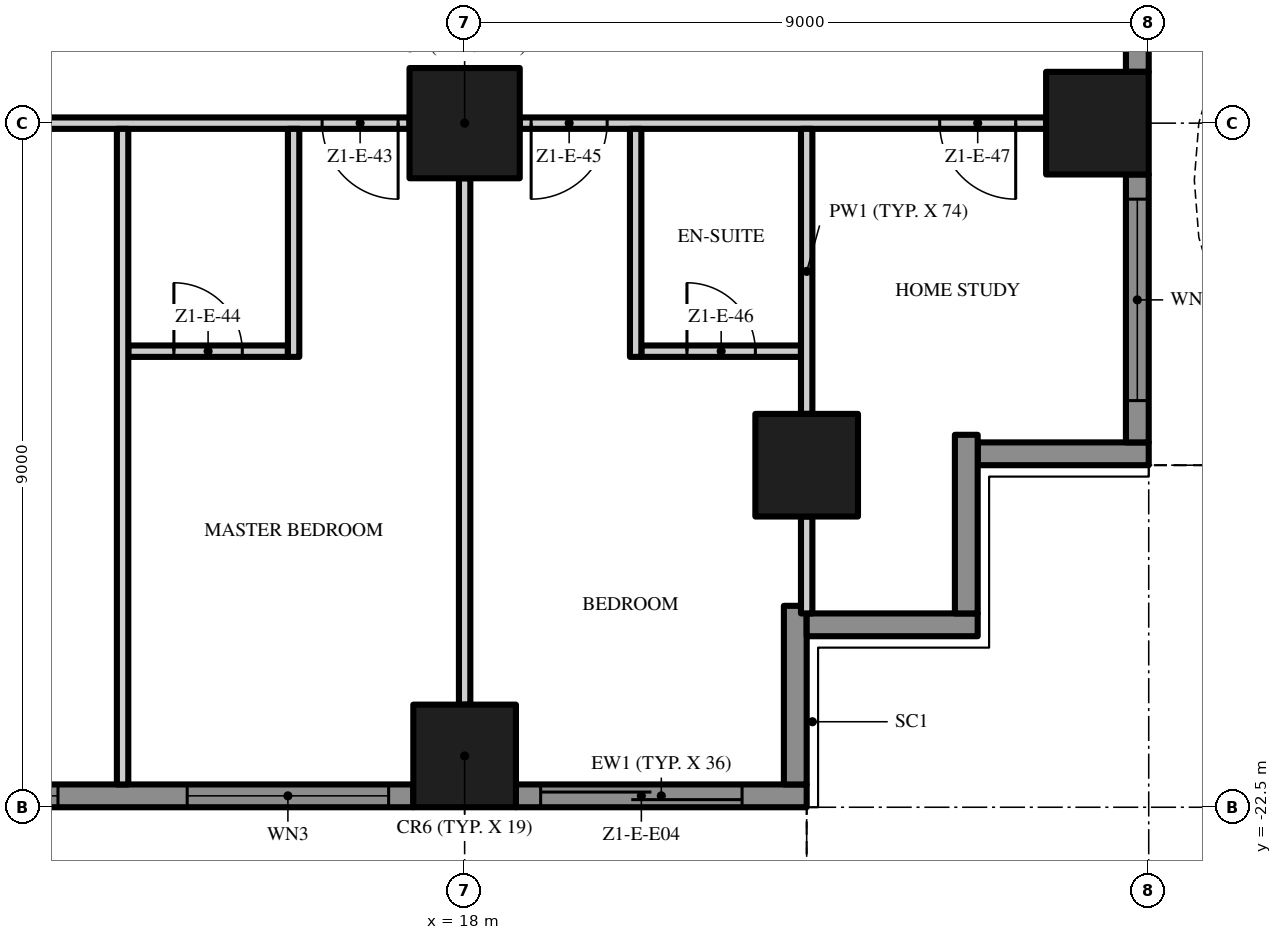
"""IFC4 building model, lengths in metres.
Left out: names, types, materials, properties, quantities, classifications, styles, units other than length and angle.
Written with IfcOpenShell. Run it as: python <this file> out.ifc"""

import sys

from ifc_helpers import new_model, si_unit, direction, frame, frame_2d, origin, origin_2d, place, context, subcontext, project, spatial, polyline, rectangle, outline, extrude, element, fill, save


model = new_model("IFC4")
c1 = context("Model", 3, precision=1e-05, world=origin(), true_north=direction((0.0, 1.0)))
c2 = subcontext(c1, "Body", "Model", "MODEL_VIEW")
j1 = project(units=[si_unit("LENGTHUNIT", "METRE"), si_unit("PLANEANGLEUNIT", "RADIAN")], contexts=[c1])
p1 = place(None, origin())
s1 = spatial("IfcSite", under=j1, at=p1, CompositionType="ELEMENT")
p2 = place(p1, origin())
s2 = spatial("IfcBuilding", under=s1, at=p2, CompositionType="ELEMENT")
p3 = place(p2, frame((0.0, 0.0, 60.6)))
s3 = spatial("IfcBuildingStorey", under=s2, at=p3, CompositionType="ELEMENT", Elevation=60.6)
p4 = place(p3, frame((18.0, -13.5, 0.0), z_axis=(0.0, 0.0, 1.0), x_axis=(1.0, 0.0, 0.0)))
e1 = element("IfcColumn", 1, at=p4, inside=s3, PredefinedType="COLUMN", context=c2, shape_type="SweptSolid", body=[
    extrude(rectangle(XDim=1.45, YDim=1.45, at=origin_2d()), origin(), (0.0, 0.0, 1.0), 3.5),
])
for number, where, z_axis, x_axis in (
    (2, (18.0, -21.825, 0.0), (0.0, 0.0, 1.0), (1.0, 0.0, 0.0)),
    (3, (26.325, -13.5, 0.0), (0.0, 0.0, 1.0), (1.0, 0.0, 0.0)),
    (4, (22.5, -18.0, 0.0), (0.0, 0.0, 1.0), (1.0, 0.0, 0.0)),
):
    element("IfcColumn", number, at=place(p3, frame(where, z_axis=z_axis, x_axis=x_axis)), inside=s3, PredefinedType="COLUMN", context=c2, shape_type="SweptSolid", body=[
        extrude(rectangle(XDim=1.35, YDim=1.35, at=origin_2d()), origin(), (0.0, 0.0, 1.0), 3.5),
    ])
p5 = place(p3, frame((17.325, -22.35, 0.0), z_axis=(0.0, 0.0, 1.0), x_axis=(-1.0, 0.0, 0.0)))
e5 = element("IfcWall", 5, at=p5, inside=s3, PredefinedType="SOLIDWALL", context=c2, shape_type="SweptSolid", body=[
    extrude(rectangle(XDim=7.65, YDim=0.3, at=frame_2d((3.825, 0.0))), origin(), (0.0, 0.0, 1.0), 3.5),
])
p6 = place(p5, frame((4.675, 0.0, 0.45)))
e6 = element("IfcOpeningElement", 6, at=p6, cuts=e5, PredefinedType="OPENING", context=c2, shape_type="SweptSolid", body=[
    extrude(rectangle(XDim=2.65, YDim=2.65, at=frame_2d((1.325, 1.325))), frame((0.0, 0.16, 0.0), z_axis=(0.0, -1.0, 0.0), x_axis=(1.0, 0.0, 0.0)), (0.0, 0.0, 1.0), 0.32),
])
p7 = place(p5, frame((0.325, 0.0, 0.45)))
e7 = element("IfcOpeningElement", 7, at=p7, cuts=e5, PredefinedType="OPENING", context=c2, shape_type="SweptSolid", body=[
    extrude(rectangle(XDim=2.65, YDim=2.65, at=frame_2d((1.325, 1.325))), frame((0.0, 0.16, 0.0), z_axis=(0.0, -1.0, 0.0), x_axis=(1.0, 0.0, 0.0)), (0.0, 0.0, 1.0), 0.32),
])
p8 = place(p3, frame((22.5, -22.35, 0.0), z_axis=(0.0, 0.0, 1.0), x_axis=(-1.0, 0.0, 0.0)))
e8 = element("IfcWall", 8, at=p8, inside=s3, PredefinedType="SOLIDWALL", context=c2, shape_type="SweptSolid", body=[
    extrude(rectangle(XDim=3.825, YDim=0.3, at=frame_2d((1.913, 0.0))), origin(), (0.0, 0.0, 1.0), 3.5),
])
p9 = place(p8, frame((0.85, 0.0, 0.0)))
e9 = element("IfcOpeningElement", 9, at=p9, cuts=e8, PredefinedType="OPENING", context=c2, shape_type="SweptSolid", body=[
    extrude(rectangle(XDim=2.65, YDim=2.4, at=frame_2d((1.325, 1.2))), frame((0.0, 0.16, 0.0), z_axis=(0.0, -1.0, 0.0), x_axis=(1.0, 0.0, 0.0)), (0.0, 0.0, 1.0), 0.32),
])
p10 = place(p3, frame((22.35, -19.85, 0.0), z_axis=(0.0, 0.0, 1.0), x_axis=(0.0, -1.0, 0.0)))
e10 = element("IfcWall", 10, at=p10, inside=s3, PredefinedType="SOLIDWALL", context=c2, shape_type="SweptSolid", body=[
    extrude(rectangle(XDim=2.35, YDim=0.3, at=frame_2d((1.175, 0.0))), origin(), (0.0, 0.0, 1.0), 3.5),
])
p11 = place(p3, frame((24.75, -20.1, 0.0), z_axis=(0.0, 0.0, 1.0), x_axis=(-1.0, 0.0, 0.0)))
e11 = element("IfcWall", 11, at=p11, inside=s3, PredefinedType="SOLIDWALL", context=c2, shape_type="SweptSolid", body=[
    extrude(rectangle(XDim=2.25, YDim=0.3, at=frame_2d((1.125, 0.0))), origin(), (0.0, 0.0, 1.0), 3.5),
])
p12 = place(p3, frame((24.6, -17.6, 0.0), z_axis=(0.0, 0.0, 1.0), x_axis=(0.0, -1.0, 0.0)))
e12 = element("IfcWall", 12, at=p12, inside=s3, PredefinedType="SOLIDWALL", context=c2, shape_type="SweptSolid", body=[
    extrude(rectangle(XDim=2.35, YDim=0.3, at=frame_2d((1.175, 0.0))), origin(), (0.0, 0.0, 1.0), 3.5),
])
p13 = place(p3, frame((27.0, -17.85, 0.0), z_axis=(0.0, 0.0, 1.0), x_axis=(-1.0, 0.0, 0.0)))
e13 = element("IfcWall", 13, at=p13, inside=s3, PredefinedType="SOLIDWALL", context=c2, shape_type="SweptSolid", body=[
    extrude(rectangle(XDim=2.25, YDim=0.3, at=frame_2d((1.125, 0.0))), origin(), (0.0, 0.0, 1.0), 3.5),
])
p14 = place(p3, frame((26.85, -14.175, 0.0), z_axis=(0.0, 0.0, 1.0), x_axis=(0.0, -1.0, 0.0)))
e14 = element("IfcWall", 14, at=p14, inside=s3, PredefinedType="SOLIDWALL", context=c2, shape_type="SweptSolid", body=[
    extrude(rectangle(XDim=3.525, YDim=0.3, at=frame_2d((1.762, 0.0))), origin(), (0.0, 0.0, 1.0), 3.5),
])
p15 = place(p14, frame((0.325, 0.0, 0.45)))
e15 = element("IfcOpeningElement", 15, at=p15, cuts=e14, PredefinedType="OPENING", context=c2, shape_type="SweptSolid", body=[
    extrude(rectangle(XDim=2.65, YDim=2.65, at=frame_2d((1.325, 1.325))), frame((0.0, 0.16, 0.0), z_axis=(0.0, -1.0, 0.0), x_axis=(1.0, 0.0, 0.0)), (0.0, 0.0, 1.0), 0.32),
])
p16 = place(p3, frame((26.85, -5.175, 0.0), z_axis=(0.0, 0.0, 1.0), x_axis=(0.0, -1.0, 0.0)))
e16 = element("IfcWall", 16, at=p16, inside=s3, PredefinedType="SOLIDWALL", context=c2, shape_type="SweptSolid", body=[
    extrude(rectangle(XDim=7.65, YDim=0.3, at=frame_2d((3.825, 0.0))), origin(), (0.0, 0.0, 1.0), 3.5),
])
p17 = place(p16, frame((4.675, 0.0, 0.45)))
e17 = element("IfcOpeningElement", 17, at=p17, cuts=e16, PredefinedType="OPENING", context=c2, shape_type="SweptSolid", body=[
    extrude(rectangle(XDim=2.65, YDim=2.65, at=frame_2d((1.325, 1.325))), frame((0.0, 0.16, 0.0), z_axis=(0.0, -1.0, 0.0), x_axis=(1.0, 0.0, 0.0)), (0.0, 0.0, 1.0), 0.32),
])
p18 = place(p16, frame((0.325, 0.0, 0.0)))
e18 = element("IfcOpeningElement", 18, at=p18, cuts=e16, PredefinedType="OPENING", context=c2, shape_type="SweptSolid", body=[
    extrude(rectangle(XDim=2.65, YDim=2.4, at=frame_2d((1.325, 1.2))), frame((0.0, 0.16, 0.0), z_axis=(0.0, -1.0, 0.0), x_axis=(1.0, 0.0, 0.0)), (0.0, 0.0, 1.0), 0.32),
])
p19 = place(p3, origin())
e19 = element("IfcWall", 19, at=p19, inside=s3, PredefinedType="USERDEFINED", context=c2, shape_type="SweptSolid", body=[
    extrude(outline(polyline([(-22.5, -24.3), (-21.0, -23.595), (-19.5, -23.159), (-18.75, -23.1), (-18.0, -23.159), (-16.5, -23.595), (-15.0, -24.3), (-13.5, -25.005), (-12.0, -25.441), (-11.25, -25.5), (-10.5, -25.441), (-9.0, -25.005), (-7.5, -24.3), (-6.0, -23.595), (-4.5, -23.159), (-3.75, -23.1), (-3.0, -23.159), (-1.5, -23.595), (0.0, -24.3), (1.5, -25.005), (3.0, -25.441), (3.75, -25.5), (4.5, -25.441), (6.0, -25.005), (7.5, -24.3), (9.0, -23.595), (10.5, -23.159), (11.25, -23.1), (12.0, -23.159), (13.5, -23.595), (15.0, -24.3), (16.5, -25.005), (18.0, -25.441), (18.75, -25.5), (19.5, -25.441), (21.0, -25.005), (22.5, -24.3), (22.394, -24.074), (20.911, -24.771), (19.455, -25.194), (18.75, -25.249), (18.045, -25.194), (16.589, -24.771), (15.106, -24.074), (13.589, -23.36), (12.045, -22.911), (11.25, -22.849), (10.455, -22.911), (8.911, -23.36), (7.394, -24.074), (5.911, -24.771), (4.455, -25.194), (3.75, -25.249), (3.045, -25.194), (1.589, -24.771), (0.106, -24.074), (-1.411, -23.36), (-2.955, -22.911), (-3.75, -22.849), (-4.545, -22.911), (-6.089, -23.36), (-7.606, -24.074), (-9.089, -24.771), (-10.545, -25.194), (-11.25, -25.249), (-11.955, -25.194), (-13.411, -24.771), (-14.894, -24.074), (-16.411, -23.36), (-17.955, -22.911), (-18.75, -22.849), (-19.545, -22.911), (-21.089, -23.36), (-22.606, -24.074), (-22.5, -24.3)])), origin(), (0.0, 0.0, 1.0), 0.9),
])
p20 = place(p3, origin())
e20 = element("IfcWall", 20, at=p20, inside=s3, PredefinedType="USERDEFINED", context=c2, shape_type="SweptSolid", body=[
    extrude(outline(polyline([(28.8, -18.0), (28.095, -16.5), (27.659, -15.0), (27.6, -14.25), (27.659, -13.5), (28.095, -12.0), (28.8, -10.5), (29.505, -9.0), (29.941, -7.5), (30.0, -6.75), (29.941, -6.0), (29.505, -4.5), (28.8, -3.0), (28.095, -1.5), (27.659, 0.0), (27.6, 0.75), (27.659, 1.5), (28.095, 3.0), (28.8, 4.5), (29.505, 6.0), (29.941, 7.5), (30.0, 8.25), (29.941, 9.0), (29.505, 10.5), (28.8, 12.0), (28.095, 13.5), (27.659, 15.0), (27.6, 15.75), (27.659, 16.5), (28.095, 18.0), (27.855, 18.07), (27.411, 16.545), (27.349, 15.75), (27.411, 14.955), (27.86, 13.411), (28.574, 11.894), (29.271, 10.411), (29.694, 8.955), (29.749, 8.25), (29.694, 7.545), (29.271, 6.089), (28.574, 4.606), (27.86, 3.089), (27.411, 1.545), (27.349, 0.75), (27.411, -0.045), (27.86, -1.589), (28.574, -3.106), (29.271, -4.589), (29.694, -6.045), (29.749, -6.75), (29.694, -7.455), (29.271, -8.911), (28.574, -10.394), (27.86, -11.911), (27.411, -13.455), (27.349, -14.25), (27.411, -15.045), (27.86, -16.589), (28.574, -18.106), (28.8, -18.0)])), origin(), (0.0, 0.0, 1.0), 0.9),
])
p21 = place(p3, frame((13.575, -16.5, 0.0), z_axis=(0.0, 0.0, 1.0), x_axis=(1.0, 0.0, 0.0)))
e21 = element("IfcWall", 21, at=p21, inside=s3, PredefinedType="PARTITIONING", context=c2, shape_type="SweptSolid", body=[
    extrude(rectangle(XDim=2.1, YDim=0.15, at=frame_2d((1.05, 0.0))), origin(), (0.0, 0.0, 1.0), 3.5),
])
p22 = place(p21, frame((0.6, 0.0, 0.0)))
e22 = element("IfcOpeningElement", 22, at=p22, cuts=e21, PredefinedType="OPENING", context=c2, shape_type="SweptSolid", body=[
    extrude(rectangle(XDim=0.9, YDim=2.1, at=frame_2d((0.45, 1.05))), frame((0.0, 0.085, 0.0), z_axis=(0.0, -1.0, 0.0), x_axis=(1.0, 0.0, 0.0)), (0.0, 0.0, 1.0), 0.17),
])
p23 = place(p3, frame((20.325, -16.5, 0.0), z_axis=(0.0, 0.0, 1.0), x_axis=(1.0, 0.0, 0.0)))
e23 = element("IfcWall", 23, at=p23, inside=s3, PredefinedType="PARTITIONING", context=c2, shape_type="SweptSolid", body=[
    extrude(rectangle(XDim=2.1, YDim=0.15, at=frame_2d((1.05, 0.0))), origin(), (0.0, 0.0, 1.0), 3.5),
])
p24 = place(p23, frame((0.6, 0.0, 0.0)))
e24 = element("IfcOpeningElement", 24, at=p24, cuts=e23, PredefinedType="OPENING", context=c2, shape_type="SweptSolid", body=[
    extrude(rectangle(XDim=0.9, YDim=2.1, at=frame_2d((0.45, 1.05))), frame((0.0, 0.085, 0.0), z_axis=(0.0, -1.0, 0.0), x_axis=(1.0, 0.0, 0.0)), (0.0, 0.0, 1.0), 0.17),
])
p25 = place(p3, frame((17.275, -13.5, 0.0), z_axis=(0.0, 0.0, 1.0), x_axis=(-1.0, 0.0, 0.0)))
e25 = element("IfcWall", 25, at=p25, inside=s3, PredefinedType="PARTITIONING", context=c2, shape_type="SweptSolid", body=[
    extrude(rectangle(XDim=7.55, YDim=0.15, at=frame_2d((3.775, 0.0))), origin(), (0.0, 0.0, 1.0), 3.5),
])
p26 = place(p25, frame((5.6, 0.0, 0.0)))
e26 = element("IfcOpeningElement", 26, at=p26, cuts=e25, PredefinedType="OPENING", context=c2, shape_type="SweptSolid", body=[
    extrude(rectangle(XDim=1.8, YDim=2.4, at=frame_2d((0.9, 1.2))), frame((0.0, 0.085, 0.0), z_axis=(0.0, -1.0, 0.0), x_axis=(1.0, 0.0, 0.0)), (0.0, 0.0, 1.0), 0.17),
])
p27 = place(p25, frame((0.15, 0.0, 0.0)))
e27 = element("IfcOpeningElement", 27, at=p27, cuts=e25, PredefinedType="OPENING", context=c2, shape_type="SweptSolid", body=[
    extrude(rectangle(XDim=1.0, YDim=2.4, at=frame_2d((0.5, 1.2))), frame((0.0, 0.085, 0.0), z_axis=(0.0, -1.0, 0.0), x_axis=(1.0, 0.0, 0.0)), (0.0, 0.0, 1.0), 0.17),
])
p28 = place(p3, frame((25.65, -13.5, 0.0), z_axis=(0.0, 0.0, 1.0), x_axis=(-1.0, 0.0, 0.0)))
e28 = element("IfcWall", 28, at=p28, inside=s3, PredefinedType="PARTITIONING", context=c2, shape_type="SweptSolid", body=[
    extrude(rectangle(XDim=6.925, YDim=0.15, at=frame_2d((3.462, 0.0))), origin(), (0.0, 0.0, 1.0), 3.5),
])
p29 = place(p28, frame((5.775, 0.0, 0.0)))
e29 = element("IfcOpeningElement", 29, at=p29, cuts=e28, PredefinedType="OPENING", context=c2, shape_type="SweptSolid", body=[
    extrude(rectangle(XDim=1.0, YDim=2.4, at=frame_2d((0.5, 1.2))), frame((0.0, 0.085, 0.0), z_axis=(0.0, -1.0, 0.0), x_axis=(1.0, 0.0, 0.0)), (0.0, 0.0, 1.0), 0.17),
])
p30 = place(p28, frame((0.4, 0.0, 0.0)))
e30 = element("IfcOpeningElement", 30, at=p30, cuts=e28, PredefinedType="OPENING", context=c2, shape_type="SweptSolid", body=[
    extrude(rectangle(XDim=1.0, YDim=2.4, at=frame_2d((0.5, 1.2))), frame((0.0, 0.085, 0.0), z_axis=(0.0, -1.0, 0.0), x_axis=(1.0, 0.0, 0.0)), (0.0, 0.0, 1.0), 0.17),
])
p31 = place(p3, frame((13.5, -22.2, 0.0), z_axis=(0.0, 0.0, 1.0), x_axis=(0.0, 1.0, 0.0)))
e31 = element("IfcWall", 31, at=p31, inside=s3, PredefinedType="PARTITIONING", context=c2, shape_type="SweptSolid", body=[
    extrude(rectangle(XDim=8.625, YDim=0.15, at=frame_2d((4.312, 0.0))), origin(), (0.0, 0.0, 1.0), 3.5),
])
p32 = place(p3, frame((15.75, -16.575, 0.0), z_axis=(0.0, 0.0, 1.0), x_axis=(0.0, 1.0, 0.0)))
e32 = element("IfcWall", 32, at=p32, inside=s3, PredefinedType="PARTITIONING", context=c2, shape_type="SweptSolid", body=[
    extrude(rectangle(XDim=3.0, YDim=0.15, at=frame_2d((1.5, 0.0))), origin(), (0.0, 0.0, 1.0), 3.5),
])
p33 = place(p3, frame((18.0, -21.15, 0.0), z_axis=(0.0, 0.0, 1.0), x_axis=(0.0, 1.0, 0.0)))
e33 = element("IfcWall", 33, at=p33, inside=s3, PredefinedType="PARTITIONING", context=c2, shape_type="SweptSolid", body=[
    extrude(rectangle(XDim=6.925, YDim=0.15, at=frame_2d((3.462, 0.0))), origin(), (0.0, 0.0, 1.0), 3.5),
])
p34 = place(p3, frame((20.25, -16.575, 0.0), z_axis=(0.0, 0.0, 1.0), x_axis=(0.0, 1.0, 0.0)))
e34 = element("IfcWall", 34, at=p34, inside=s3, PredefinedType="PARTITIONING", context=c2, shape_type="SweptSolid", body=[
    extrude(rectangle(XDim=3.0, YDim=0.15, at=frame_2d((1.5, 0.0))), origin(), (0.0, 0.0, 1.0), 3.5),
])
p35 = place(p3, frame((22.5, -19.95, 0.0), z_axis=(0.0, 0.0, 1.0), x_axis=(0.0, 1.0, 0.0)))
e35 = element("IfcWall", 35, at=p35, inside=s3, PredefinedType="PARTITIONING", context=c2, shape_type="SweptSolid", body=[
    extrude(rectangle(XDim=1.275, YDim=0.15, at=frame_2d((0.637, 0.0))), origin(), (0.0, 0.0, 1.0), 3.5),
])
p36 = place(p3, frame((22.5, -17.325, 0.0), z_axis=(0.0, 0.0, 1.0), x_axis=(0.0, 1.0, 0.0)))
e36 = element("IfcWall", 36, at=p36, inside=s3, PredefinedType="PARTITIONING", context=c2, shape_type="SweptSolid", body=[
    extrude(rectangle(XDim=3.75, YDim=0.15, at=frame_2d((1.875, 0.0))), origin(), (0.0, 0.0, 1.0), 3.5),
])
p37 = place(p6, origin())
e37 = element("IfcWindow", 37, at=p37, inside=s3, PartitioningType="SINGLE_PANEL", PredefinedType="WINDOW", context=c2, shape_type="SweptSolid", body=[
    extrude(rectangle(XDim=2.65, YDim=2.65, at=frame_2d((1.325, 1.325))), frame((0.0, 0.03, 0.0), z_axis=(0.0, -1.0, 0.0), x_axis=(1.0, 0.0, 0.0)), (0.0, 0.0, 1.0), 0.06),
])
fill(e6, e37)
p38 = place(p7, origin())
e38 = element("IfcWindow", 38, at=p38, inside=s3, PartitioningType="SINGLE_PANEL", PredefinedType="WINDOW", context=c2, shape_type="SweptSolid", body=[
    extrude(rectangle(XDim=2.65, YDim=2.65, at=frame_2d((1.325, 1.325))), frame((0.0, 0.03, 0.0), z_axis=(0.0, -1.0, 0.0), x_axis=(1.0, 0.0, 0.0)), (0.0, 0.0, 1.0), 0.06),
])
fill(e7, e38)
p39 = place(p9, origin())
e39 = element("IfcDoor", 39, at=p39, inside=s3, OperationType="SINGLE_SWING_LEFT", PredefinedType="DOOR", context=c2, shape_type="SweptSolid", body=[
    extrude(rectangle(XDim=2.65, YDim=2.4, at=frame_2d((1.325, 1.2))), frame((0.0, 0.025, 0.0), z_axis=(0.0, -1.0, 0.0), x_axis=(1.0, 0.0, 0.0)), (0.0, 0.0, 1.0), 0.05),
])
fill(e9, e39)
p40 = place(p15, origin())
e40 = element("IfcWindow", 40, at=p40, inside=s3, PartitioningType="SINGLE_PANEL", PredefinedType="WINDOW", context=c2, shape_type="SweptSolid", body=[
    extrude(rectangle(XDim=2.65, YDim=2.65, at=frame_2d((1.325, 1.325))), frame((0.0, 0.03, 0.0), z_axis=(0.0, -1.0, 0.0), x_axis=(1.0, 0.0, 0.0)), (0.0, 0.0, 1.0), 0.06),
])
fill(e15, e40)
p41 = place(p27, origin())
e41 = element("IfcDoor", 41, at=p41, inside=s3, OperationType="SINGLE_SWING_LEFT", PredefinedType="DOOR", context=c2, shape_type="SweptSolid", body=[
    extrude(rectangle(XDim=1.0, YDim=2.4, at=frame_2d((0.5, 1.2))), frame((0.0, 0.025, 0.0), z_axis=(0.0, -1.0, 0.0), x_axis=(1.0, 0.0, 0.0)), (0.0, 0.0, 1.0), 0.05),
])
fill(e27, e41)
p42 = place(p22, origin())
e42 = element("IfcDoor", 42, at=p42, inside=s3, OperationType="SINGLE_SWING_LEFT", PredefinedType="DOOR", context=c2, shape_type="SweptSolid", body=[
    extrude(rectangle(XDim=0.9, YDim=2.1, at=frame_2d((0.45, 1.05))), frame((0.0, 0.025, 0.0), z_axis=(0.0, -1.0, 0.0), x_axis=(1.0, 0.0, 0.0)), (0.0, 0.0, 1.0), 0.05),
])
fill(e22, e42)
p43 = place(p29, origin())
e43 = element("IfcDoor", 43, at=p43, inside=s3, OperationType="SINGLE_SWING_RIGHT", PredefinedType="DOOR", context=c2, shape_type="SweptSolid", body=[
    extrude(rectangle(XDim=1.0, YDim=2.4, at=frame_2d((0.5, 1.2))), frame((0.0, 0.025, 0.0), z_axis=(0.0, -1.0, 0.0), x_axis=(1.0, 0.0, 0.0)), (0.0, 0.0, 1.0), 0.05),
])
fill(e29, e43)
p44 = place(p24, origin())
e44 = element("IfcDoor", 44, at=p44, inside=s3, OperationType="SINGLE_SWING_LEFT", PredefinedType="DOOR", context=c2, shape_type="SweptSolid", body=[
    extrude(rectangle(XDim=0.9, YDim=2.1, at=frame_2d((0.45, 1.05))), frame((0.0, 0.025, 0.0), z_axis=(0.0, -1.0, 0.0), x_axis=(1.0, 0.0, 0.0)), (0.0, 0.0, 1.0), 0.05),
])
fill(e24, e44)
p45 = place(p30, origin())
e45 = element("IfcDoor", 45, at=p45, inside=s3, OperationType="SINGLE_SWING_LEFT", PredefinedType="DOOR", context=c2, shape_type="SweptSolid", body=[
    extrude(rectangle(XDim=1.0, YDim=2.4, at=frame_2d((0.5, 1.2))), frame((0.0, 0.025, 0.0), z_axis=(0.0, -1.0, 0.0), x_axis=(1.0, 0.0, 0.0)), (0.0, 0.0, 1.0), 0.05),
])
fill(e30, e45)
save(model, sys.argv[1])
